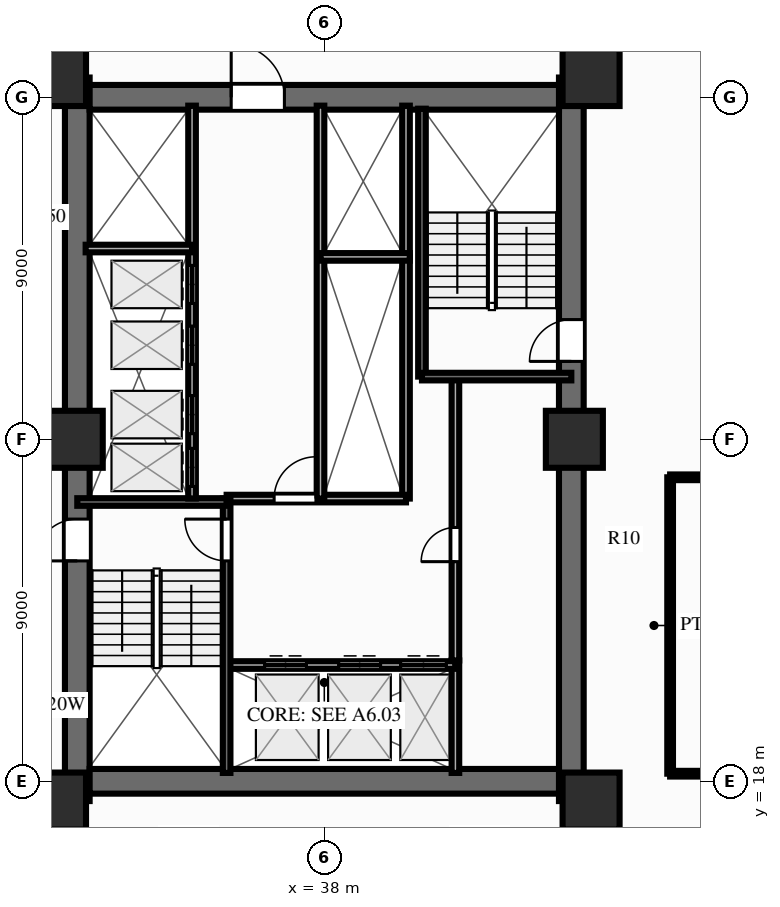
"""IFC4 building model, lengths in metres.
Left out: names, types, materials, properties, quantities, classifications, styles, units other than length and angle.
Written with IfcOpenShell. Run it as: python <this file> out.ifc"""

import sys

from ifc_helpers import new_model, si_unit, direction, frame, frame_2d, origin, origin_2d, place, context, subcontext, project, spatial, rectangle, extrude, source, transform, mapped, element, fill, save


model = new_model("IFC4")
c1 = context("Model", 3, precision=1e-05, world=origin(), true_north=direction((0.0, 1.0)))
c2 = subcontext(c1, "Body", "Model", "MODEL_VIEW")
j1 = project(units=[si_unit("LENGTHUNIT", "METRE"), si_unit("PLANEANGLEUNIT", "RADIAN")], contexts=[c1])
p1 = place(None, origin())
s1 = spatial("IfcSite", under=j1, at=p1, CompositionType="ELEMENT")
p2 = place(p1, origin())
s2 = spatial("IfcBuilding", under=s1, at=p2, CompositionType="ELEMENT")
p3 = place(p2, frame((0.0, 0.0, 4.2)))
s3 = spatial("IfcBuildingStorey", under=s2, at=p3, CompositionType="ELEMENT", Elevation=4.2)
p4 = place(p3, frame((31.5, 17.48, 0.0), z_axis=(0.0, 0.0, 1.0), x_axis=(0.0, 1.0, 0.0)))
e1 = element("IfcWall", 1, at=p4, inside=s3, PredefinedType="SHEAR", context=c2, shape_type="SweptSolid", body=[
    extrude(rectangle(XDim=19.04, YDim=0.65, at=frame_2d((9.52, 0.0))), origin(), (0.0, 0.0, 1.0), 3.6),
])
p5 = place(p4, frame((6.32, 0.0, 0.0)))
e2 = element("IfcOpeningElement", 2, at=p5, cuts=e1, PredefinedType="OPENING", context=c2, shape_type="SweptSolid", body=[
    extrude(rectangle(XDim=1.1, YDim=2.15, at=frame_2d((0.55, 1.075))), frame((0.0, 0.337, 0.0), z_axis=(0.0, -1.0, 0.0), x_axis=(1.0, 0.0, 0.0)), (0.0, 0.0, 1.0), 0.674),
])
p6 = place(p3, frame((44.5, 17.48, 0.0), z_axis=(0.0, 0.0, 1.0), x_axis=(0.0, 1.0, 0.0)))
e3 = element("IfcWall", 3, at=p6, inside=s3, PredefinedType="SHEAR", context=c2, shape_type="SweptSolid", body=[
    extrude(rectangle(XDim=19.04, YDim=0.65, at=frame_2d((9.52, 0.0))), origin(), (0.0, 0.0, 1.0), 3.6),
])
p7 = place(p6, frame((12.67, 0.0, 0.0), z_axis=(0.0, 0.0, 1.0), x_axis=(-1.0, 0.0, 0.0)))
e4 = element("IfcOpeningElement", 4, at=p7, cuts=e3, PredefinedType="OPENING", context=c2, shape_type="SweptSolid", body=[
    extrude(rectangle(XDim=1.1, YDim=2.15, at=frame_2d((0.55, 1.075))), frame((0.0, 0.337, 0.0), z_axis=(0.0, -1.0, 0.0), x_axis=(1.0, 0.0, 0.0)), (0.0, 0.0, 1.0), 0.674),
])
p8 = place(p3, frame((31.825, 18.0, 0.0), z_axis=(0.0, 0.0, 1.0), x_axis=(1.0, 0.0, 0.0)))
e5 = element("IfcWall", 5, at=p8, inside=s3, PredefinedType="SHEAR", context=c2, shape_type="SweptSolid", body=[
    extrude(rectangle(XDim=12.35, YDim=0.65, at=frame_2d((6.175, 0.0))), origin(), (0.0, 0.0, 1.0), 3.6),
])
p9 = place(p3, frame((31.825, 36.0, 0.0), z_axis=(0.0, 0.0, 1.0), x_axis=(1.0, 0.0, 0.0)))
e6 = element("IfcWall", 6, at=p9, inside=s3, PredefinedType="SHEAR", context=c2, shape_type="SweptSolid", body=[
    extrude(rectangle(XDim=12.35, YDim=0.65, at=frame_2d((6.175, 0.0))), origin(), (0.0, 0.0, 1.0), 3.6),
])
p10 = place(p9, frame((5.125, 0.0, 0.0), z_axis=(0.0, 0.0, 1.0), x_axis=(-1.0, 0.0, 0.0)))
e7 = element("IfcOpeningElement", 7, at=p10, cuts=e6, PredefinedType="OPENING", context=c2, shape_type="SweptSolid", body=[
    extrude(rectangle(XDim=1.4, YDim=2.15, at=frame_2d((0.7, 1.075))), frame((0.0, 0.337, 0.0), z_axis=(0.0, -1.0, 0.0), x_axis=(1.0, 0.0, 0.0)), (0.0, 0.0, 1.0), 0.674),
])
m1 = source(origin(), c2, "Body", "SweptSolid", [
    extrude(rectangle(XDim=1.5, YDim=1.5, at=origin_2d()), origin(), (0.0, 0.0, 1.0), 3.6),
])
for number, where, z_axis, x_axis in (
    (8, (30.98, 17.48, 0.0), (0.0, 0.0, 1.0), (1.0, 0.0, 0.0)),
    (9, (45.02, 17.48, 0.0), (0.0, 0.0, 1.0), (1.0, 0.0, 0.0)),
    (10, (30.98, 36.52, 0.0), (0.0, 0.0, 1.0), (1.0, 0.0, 0.0)),
    (11, (45.02, 36.52, 0.0), (0.0, 0.0, 1.0), (1.0, 0.0, 0.0)),
    (12, (31.42, 27.0, 0.0), (0.0, 0.0, 1.0), (1.0, 0.0, 0.0)),
    (13, (44.58, 27.0, 0.0), (0.0, 0.0, 1.0), (1.0, 0.0, 0.0)),
):
    element("IfcColumn", number, at=place(p3, frame(where, z_axis=z_axis, x_axis=x_axis)), inside=s3, PredefinedType="COLUMN", context=c2, shape_type="MappedRepresentation", body=[
        mapped(m1, transform((0.0, 0.0, 0.0), scale=1.0)),
    ])
p11 = place(p3, frame((41.45, 18.22, 0.0), z_axis=(0.0, 0.0, 1.0), x_axis=(0.0, 1.0, 0.0)))
e14 = element("IfcWall", 14, at=p11, inside=s3, PredefinedType="PARTITIONING", context=c2, shape_type="SweptSolid", body=[
    extrude(rectangle(XDim=2.96, YDim=0.2, at=frame_2d((1.48, 0.0))), origin(), (0.0, 0.0, 1.0), 3.32),
])
p12 = place(p3, frame((41.45, 21.18, 0.0), z_axis=(0.0, 0.0, 1.0), x_axis=(0.0, 1.0, 0.0)))
e15 = element("IfcWall", 15, at=p12, inside=s3, PredefinedType="PARTITIONING", context=c2, shape_type="SweptSolid", body=[
    extrude(rectangle(XDim=7.42, YDim=0.2, at=frame_2d((3.71, 0.0))), origin(), (0.0, 0.0, 1.0), 3.32),
])
p13 = place(p12, frame((2.6, 0.0, 0.0)))
e16 = element("IfcOpeningElement", 16, at=p13, cuts=e15, PredefinedType="OPENING", context=c2, shape_type="SweptSolid", body=[
    extrude(rectangle(XDim=0.9, YDim=2.1, at=frame_2d((0.45, 1.05))), frame((0.0, 0.112, 0.0), z_axis=(0.0, -1.0, 0.0), x_axis=(1.0, 0.0, 0.0)), (0.0, 0.0, 1.0), 0.224),
])
p14 = place(p3, frame((40.15, 25.44, 0.0), z_axis=(0.0, 0.0, 1.0), x_axis=(0.0, 1.0, 0.0)))
e17 = element("IfcWall", 17, at=p14, inside=s3, PredefinedType="PARTITIONING", context=c2, shape_type="SweptSolid", body=[
    extrude(rectangle(XDim=6.36, YDim=0.2, at=frame_2d((3.18, 0.0))), origin(), (0.0, 0.0, 1.0), 3.32),
])
p15 = place(p3, frame((40.15, 31.8, 0.0), z_axis=(0.0, 0.0, 1.0), x_axis=(0.0, 1.0, 0.0)))
e18 = element("IfcWall", 18, at=p15, inside=s3, PredefinedType="PARTITIONING", context=c2, shape_type="SweptSolid", body=[
    extrude(rectangle(XDim=3.98, YDim=0.2, at=frame_2d((1.99, 0.0))), origin(), (0.0, 0.0, 1.0), 3.32),
])
p16 = place(p3, frame((35.43, 21.06, 0.0), z_axis=(0.0, 0.0, 1.0), x_axis=(1.0, 0.0, 0.0)))
e19 = element("IfcWall", 19, at=p16, inside=s3, PredefinedType="PARTITIONING", context=c2, shape_type="SweptSolid", body=[
    extrude(rectangle(XDim=6.02, YDim=0.2, at=frame_2d((3.01, 0.0))), origin(), (0.0, 0.0, 1.0), 3.32),
])
p17 = place(p16, frame((1.0, 0.0, 0.0)))
e20 = element("IfcOpeningElement", 20, at=p17, cuts=e19, PredefinedType="OPENING", context=c2, shape_type="SweptSolid", body=[
    extrude(rectangle(XDim=1.1, YDim=2.15, at=frame_2d((0.55, 1.075))), frame((0.0, 0.112, 0.0), z_axis=(0.0, -1.0, 0.0), x_axis=(1.0, 0.0, 0.0)), (0.0, 0.0, 1.0), 0.224),
])
p18 = place(p16, frame((2.95, 0.0, 0.0)))
e21 = element("IfcOpeningElement", 21, at=p18, cuts=e19, PredefinedType="OPENING", context=c2, shape_type="SweptSolid", body=[
    extrude(rectangle(XDim=1.1, YDim=2.15, at=frame_2d((0.55, 1.075))), frame((0.0, 0.112, 0.0), z_axis=(0.0, -1.0, 0.0), x_axis=(1.0, 0.0, 0.0)), (0.0, 0.0, 1.0), 0.224),
])
p19 = place(p16, frame((4.58, 0.0, 0.0)))
e22 = element("IfcOpeningElement", 22, at=p19, cuts=e19, PredefinedType="OPENING", context=c2, shape_type="SweptSolid", body=[
    extrude(rectangle(XDim=1.2, YDim=2.15, at=frame_2d((0.6, 1.075))), frame((0.0, 0.112, 0.0), z_axis=(0.0, -1.0, 0.0), x_axis=(1.0, 0.0, 0.0)), (0.0, 0.0, 1.0), 0.224),
])
p20 = place(p3, frame((35.43, 25.44, 0.0), z_axis=(0.0, 0.0, 1.0), x_axis=(1.0, 0.0, 0.0)))
e23 = element("IfcWall", 23, at=p20, inside=s3, PredefinedType="PARTITIONING", context=c2, shape_type="SweptSolid", body=[
    extrude(rectangle(XDim=4.72, YDim=0.2, at=frame_2d((2.36, 0.0))), origin(), (0.0, 0.0, 1.0), 3.32),
])
p21 = place(p20, frame((1.25, 0.0, 0.0)))
e24 = element("IfcOpeningElement", 24, at=p21, cuts=e23, PredefinedType="OPENING", context=c2, shape_type="SweptSolid", body=[
    extrude(rectangle(XDim=1.1, YDim=2.15, at=frame_2d((0.55, 1.075))), frame((0.0, 0.112, 0.0), z_axis=(0.0, -1.0, 0.0), x_axis=(1.0, 0.0, 0.0)), (0.0, 0.0, 1.0), 0.224),
])
p22 = place(p3, frame((35.43, 18.22, 0.0), z_axis=(0.0, 0.0, 1.0), x_axis=(0.0, 1.0, 0.0)))
e25 = element("IfcWall", 25, at=p22, inside=s3, PredefinedType="SOLIDWALL", context=c2, shape_type="SweptSolid", body=[
    extrude(rectangle(XDim=7.22, YDim=0.2, at=frame_2d((3.61, 0.0))), origin(), (0.0, 0.0, 1.0), 3.32),
])
p23 = place(p22, frame((6.68, 0.0, 0.0), z_axis=(0.0, 0.0, 1.0), x_axis=(-1.0, 0.0, 0.0)))
e26 = element("IfcOpeningElement", 26, at=p23, cuts=e25, PredefinedType="OPENING", context=c2, shape_type="SweptSolid", body=[
    extrude(rectangle(XDim=1.1, YDim=2.15, at=frame_2d((0.55, 1.075))), frame((0.0, 0.112, 0.0), z_axis=(0.0, -1.0, 0.0), x_axis=(1.0, 0.0, 0.0)), (0.0, 0.0, 1.0), 0.224),
])
p24 = place(p3, frame((31.5, 25.35, 0.0), z_axis=(0.0, 0.0, 1.0), x_axis=(1.0, 0.0, 0.0)))
e27 = element("IfcWall", 27, at=p24, inside=s3, PredefinedType="SOLIDWALL", context=c2, shape_type="SweptSolid", body=[
    extrude(rectangle(XDim=3.93, YDim=0.2, at=frame_2d((1.965, 0.0))), origin(), (0.0, 0.0, 1.0), 3.32),
])
p25 = place(p3, frame((40.57, 28.65, 0.0), z_axis=(0.0, 0.0, 1.0), x_axis=(0.0, 1.0, 0.0)))
e28 = element("IfcWall", 28, at=p25, inside=s3, PredefinedType="SOLIDWALL", context=c2, shape_type="SweptSolid", body=[
    extrude(rectangle(XDim=7.05, YDim=0.2, at=frame_2d((3.525, 0.0))), origin(), (0.0, 0.0, 1.0), 3.32),
])
p26 = place(p3, frame((40.57, 28.65, 0.0), z_axis=(0.0, 0.0, 1.0), x_axis=(1.0, 0.0, 0.0)))
e29 = element("IfcWall", 29, at=p26, inside=s3, PredefinedType="SOLIDWALL", context=c2, shape_type="SweptSolid", body=[
    extrude(rectangle(XDim=3.93, YDim=0.2, at=frame_2d((1.965, 0.0))), origin(), (0.0, 0.0, 1.0), 3.32),
])
p27 = place(p3, frame((34.52, 25.44, 0.0), z_axis=(0.0, 0.0, 1.0), x_axis=(0.0, 1.0, 0.0)))
e30 = element("IfcWall", 30, at=p27, inside=s3, PredefinedType="PARTITIONING", context=c2, shape_type="SweptSolid", body=[
    extrude(rectangle(XDim=10.34, YDim=0.2, at=frame_2d((5.17, 0.0))), origin(), (0.0, 0.0, 1.0), 3.32),
])
p28 = place(p27, frame((0.32, 0.0, 0.0)))
e31 = element("IfcOpeningElement", 31, at=p28, cuts=e30, PredefinedType="OPENING", context=c2, shape_type="SweptSolid", body=[
    extrude(rectangle(XDim=1.0, YDim=2.15, at=frame_2d((0.5, 1.075))), frame((0.0, 0.112, 0.0), z_axis=(0.0, -1.0, 0.0), x_axis=(1.0, 0.0, 0.0)), (0.0, 0.0, 1.0), 0.224),
])
p29 = place(p27, frame((1.71, 0.0, 0.0)))
e32 = element("IfcOpeningElement", 32, at=p29, cuts=e30, PredefinedType="OPENING", context=c2, shape_type="SweptSolid", body=[
    extrude(rectangle(XDim=1.0, YDim=2.15, at=frame_2d((0.5, 1.075))), frame((0.0, 0.112, 0.0), z_axis=(0.0, -1.0, 0.0), x_axis=(1.0, 0.0, 0.0)), (0.0, 0.0, 1.0), 0.224),
])
p30 = place(p27, frame((3.535, 0.0, 0.0)))
e33 = element("IfcOpeningElement", 33, at=p30, cuts=e30, PredefinedType="OPENING", context=c2, shape_type="SweptSolid", body=[
    extrude(rectangle(XDim=1.0, YDim=2.15, at=frame_2d((0.5, 1.075))), frame((0.0, 0.112, 0.0), z_axis=(0.0, -1.0, 0.0), x_axis=(1.0, 0.0, 0.0)), (0.0, 0.0, 1.0), 0.224),
])
p31 = place(p27, frame((5.135, 0.0, 0.0)))
e34 = element("IfcOpeningElement", 34, at=p31, cuts=e30, PredefinedType="OPENING", context=c2, shape_type="SweptSolid", body=[
    extrude(rectangle(XDim=1.0, YDim=2.15, at=frame_2d((0.5, 1.075))), frame((0.0, 0.112, 0.0), z_axis=(0.0, -1.0, 0.0), x_axis=(1.0, 0.0, 0.0)), (0.0, 0.0, 1.0), 0.224),
])
p32 = place(p3, frame((31.72, 32.02, 0.0), z_axis=(0.0, 0.0, 1.0), x_axis=(1.0, 0.0, 0.0)))
e35 = element("IfcWall", 35, at=p32, inside=s3, PredefinedType="PARTITIONING", context=c2, shape_type="SweptSolid", body=[
    extrude(rectangle(XDim=2.8, YDim=0.2, at=frame_2d((1.4, 0.0))), origin(), (0.0, 0.0, 1.0), 3.32),
])
p33 = place(p3, frame((37.9, 25.44, 0.0), z_axis=(0.0, 0.0, 1.0), x_axis=(0.0, 1.0, 0.0)))
e36 = element("IfcWall", 36, at=p33, inside=s3, PredefinedType="PARTITIONING", context=c2, shape_type="SweptSolid", body=[
    extrude(rectangle(XDim=10.34, YDim=0.2, at=frame_2d((5.17, 0.0))), origin(), (0.0, 0.0, 1.0), 3.32),
])
p34 = place(p3, frame((37.9, 31.8, 0.0), z_axis=(0.0, 0.0, 1.0), x_axis=(1.0, 0.0, 0.0)))
e37 = element("IfcWall", 37, at=p34, inside=s3, PredefinedType="PARTITIONING", context=c2, shape_type="SweptSolid", body=[
    extrude(rectangle(XDim=2.35, YDim=0.2, at=frame_2d((1.175, 0.0))), origin(), (0.0, 0.0, 1.0), 3.32),
])
for number, where, z_axis, x_axis in (
    (38, (47.1, 18.2, 0.0), (0.0, 0.0, 1.0), (1.0, 0.0, 0.0)),
    (39, (47.1, 26.0, 0.0), (0.0, 0.0, 1.0), (1.0, 0.0, 0.0)),
):
    element("IfcWall", number, at=place(p3, frame(where, z_axis=z_axis, x_axis=x_axis)), inside=s3, PredefinedType="PARTITIONING", context=c2, shape_type="SweptSolid", body=[
        extrude(rectangle(XDim=16.8, YDim=0.15, at=frame_2d((8.4, 0.0))), origin(), (0.0, 0.0, 1.0), 3.32),
    ])
p35 = place(p3, frame((47.1, 18.2, 0.0), z_axis=(0.0, 0.0, 1.0), x_axis=(0.0, 1.0, 0.0)))
e40 = element("IfcWall", 40, at=p35, inside=s3, PredefinedType="PARTITIONING", context=c2, shape_type="SweptSolid", body=[
    extrude(rectangle(XDim=7.8, YDim=0.15, at=frame_2d((3.9, 0.0))), origin(), (0.0, 0.0, 1.0), 3.32),
])
m2 = source(origin(), c2, "Body", "SweptSolid", [
    extrude(rectangle(XDim=1.1, YDim=2.15, at=frame_2d((0.55, 1.075))), frame((0.0, 0.025, 0.0), z_axis=(0.0, -1.0, 0.0), x_axis=(1.0, 0.0, 0.0)), (0.0, 0.0, 1.0), 0.05),
])
p36 = place(p5, origin())
e41 = element("IfcDoor", 41, at=p36, inside=s3, OperationType="SINGLE_SWING_LEFT", PredefinedType="DOOR", context=c2, shape_type="MappedRepresentation", body=[
    mapped(m2, transform((0.0, 0.0, 0.0), scale=1.0)),
])
fill(e2, e41)
p37 = place(p7, origin())
e42 = element("IfcDoor", 42, at=p37, inside=s3, OperationType="SINGLE_SWING_RIGHT", PredefinedType="DOOR", context=c2, shape_type="MappedRepresentation", body=[
    mapped(m2, transform((0.0, 0.0, 0.0), scale=1.0)),
])
fill(e4, e42)
m3 = source(origin(), c2, "Body", "SweptSolid", [
    extrude(rectangle(XDim=1.4, YDim=2.15, at=frame_2d((0.7, 1.075))), frame((0.0, 0.025, 0.0), z_axis=(0.0, -1.0, 0.0), x_axis=(1.0, 0.0, 0.0)), (0.0, 0.0, 1.0), 0.05),
])
p38 = place(p10, origin())
e43 = element("IfcDoor", 43, at=p38, inside=s3, OperationType="SINGLE_SWING_RIGHT", PredefinedType="DOOR", context=c2, shape_type="MappedRepresentation", body=[
    mapped(m3, transform((0.0, 0.0, 0.0), scale=1.0)),
])
fill(e7, e43)
m4 = source(origin(), c2, "Body", "SweptSolid", [
    extrude(rectangle(XDim=0.9, YDim=2.1, at=frame_2d((0.45, 1.05))), frame((0.0, 0.025, 0.0), z_axis=(0.0, -1.0, 0.0), x_axis=(1.0, 0.0, 0.0)), (0.0, 0.0, 1.0), 0.05),
])
p39 = place(p13, origin())
e44 = element("IfcDoor", 44, at=p39, inside=s3, OperationType="SINGLE_SWING_LEFT", PredefinedType="DOOR", context=c2, shape_type="MappedRepresentation", body=[
    mapped(m4, transform((0.0, 0.0, 0.0), scale=1.0)),
])
fill(e16, e44)
p40 = place(p17, origin())
e45 = element("IfcDoor", 45, at=p40, inside=s3, OperationType="DOUBLE_DOOR_SLIDING", PredefinedType="DOOR", context=c2, shape_type="MappedRepresentation", body=[
    mapped(m2, transform((0.0, 0.0, 0.0), scale=1.0)),
])
fill(e20, e45)
p41 = place(p18, origin())
e46 = element("IfcDoor", 46, at=p41, inside=s3, OperationType="DOUBLE_DOOR_SLIDING", PredefinedType="DOOR", context=c2, shape_type="MappedRepresentation", body=[
    mapped(m2, transform((0.0, 0.0, 0.0), scale=1.0)),
])
fill(e21, e46)
m5 = source(origin(), c2, "Body", "SweptSolid", [
    extrude(rectangle(XDim=1.2, YDim=2.15, at=frame_2d((0.6, 1.075))), frame((0.0, 0.025, 0.0), z_axis=(0.0, -1.0, 0.0), x_axis=(1.0, 0.0, 0.0)), (0.0, 0.0, 1.0), 0.05),
])
p42 = place(p19, origin())
e47 = element("IfcDoor", 47, at=p42, inside=s3, OperationType="DOUBLE_DOOR_SLIDING", PredefinedType="DOOR", context=c2, shape_type="MappedRepresentation", body=[
    mapped(m5, transform((0.0, 0.0, 0.0), scale=1.0)),
])
fill(e22, e47)
p43 = place(p21, origin())
e48 = element("IfcDoor", 48, at=p43, inside=s3, OperationType="SINGLE_SWING_RIGHT", PredefinedType="DOOR", context=c2, shape_type="MappedRepresentation", body=[
    mapped(m2, transform((0.0, 0.0, 0.0), scale=1.0)),
])
fill(e24, e48)
p44 = place(p23, origin())
e49 = element("IfcDoor", 49, at=p44, inside=s3, OperationType="SINGLE_SWING_LEFT", PredefinedType="DOOR", context=c2, shape_type="MappedRepresentation", body=[
    mapped(m2, transform((0.0, 0.0, 0.0), scale=1.0)),
])
fill(e26, e49)
m6 = source(origin(), c2, "Body", "SweptSolid", [
    extrude(rectangle(XDim=1.0, YDim=2.15, at=frame_2d((0.5, 1.075))), frame((0.0, 0.025, 0.0), z_axis=(0.0, -1.0, 0.0), x_axis=(1.0, 0.0, 0.0)), (0.0, 0.0, 1.0), 0.05),
])
p45 = place(p28, origin())
e50 = element("IfcDoor", 50, at=p45, inside=s3, OperationType="DOUBLE_DOOR_SLIDING", PredefinedType="DOOR", context=c2, shape_type="MappedRepresentation", body=[
    mapped(m6, transform((0.0, 0.0, 0.0), scale=1.0)),
])
fill(e31, e50)
p46 = place(p29, origin())
e51 = element("IfcDoor", 51, at=p46, inside=s3, OperationType="DOUBLE_DOOR_SLIDING", PredefinedType="DOOR", context=c2, shape_type="MappedRepresentation", body=[
    mapped(m6, transform((0.0, 0.0, 0.0), scale=1.0)),
])
fill(e32, e51)
p47 = place(p30, origin())
e52 = element("IfcDoor", 52, at=p47, inside=s3, OperationType="DOUBLE_DOOR_SLIDING", PredefinedType="DOOR", context=c2, shape_type="MappedRepresentation", body=[
    mapped(m6, transform((0.0, 0.0, 0.0), scale=1.0)),
])
fill(e33, e52)
p48 = place(p31, origin())
e53 = element("IfcDoor", 53, at=p48, inside=s3, OperationType="DOUBLE_DOOR_SLIDING", PredefinedType="DOOR", context=c2, shape_type="MappedRepresentation", body=[
    mapped(m6, transform((0.0, 0.0, 0.0), scale=1.0)),
])
fill(e34, e53)
save(model, sys.argv[1])
